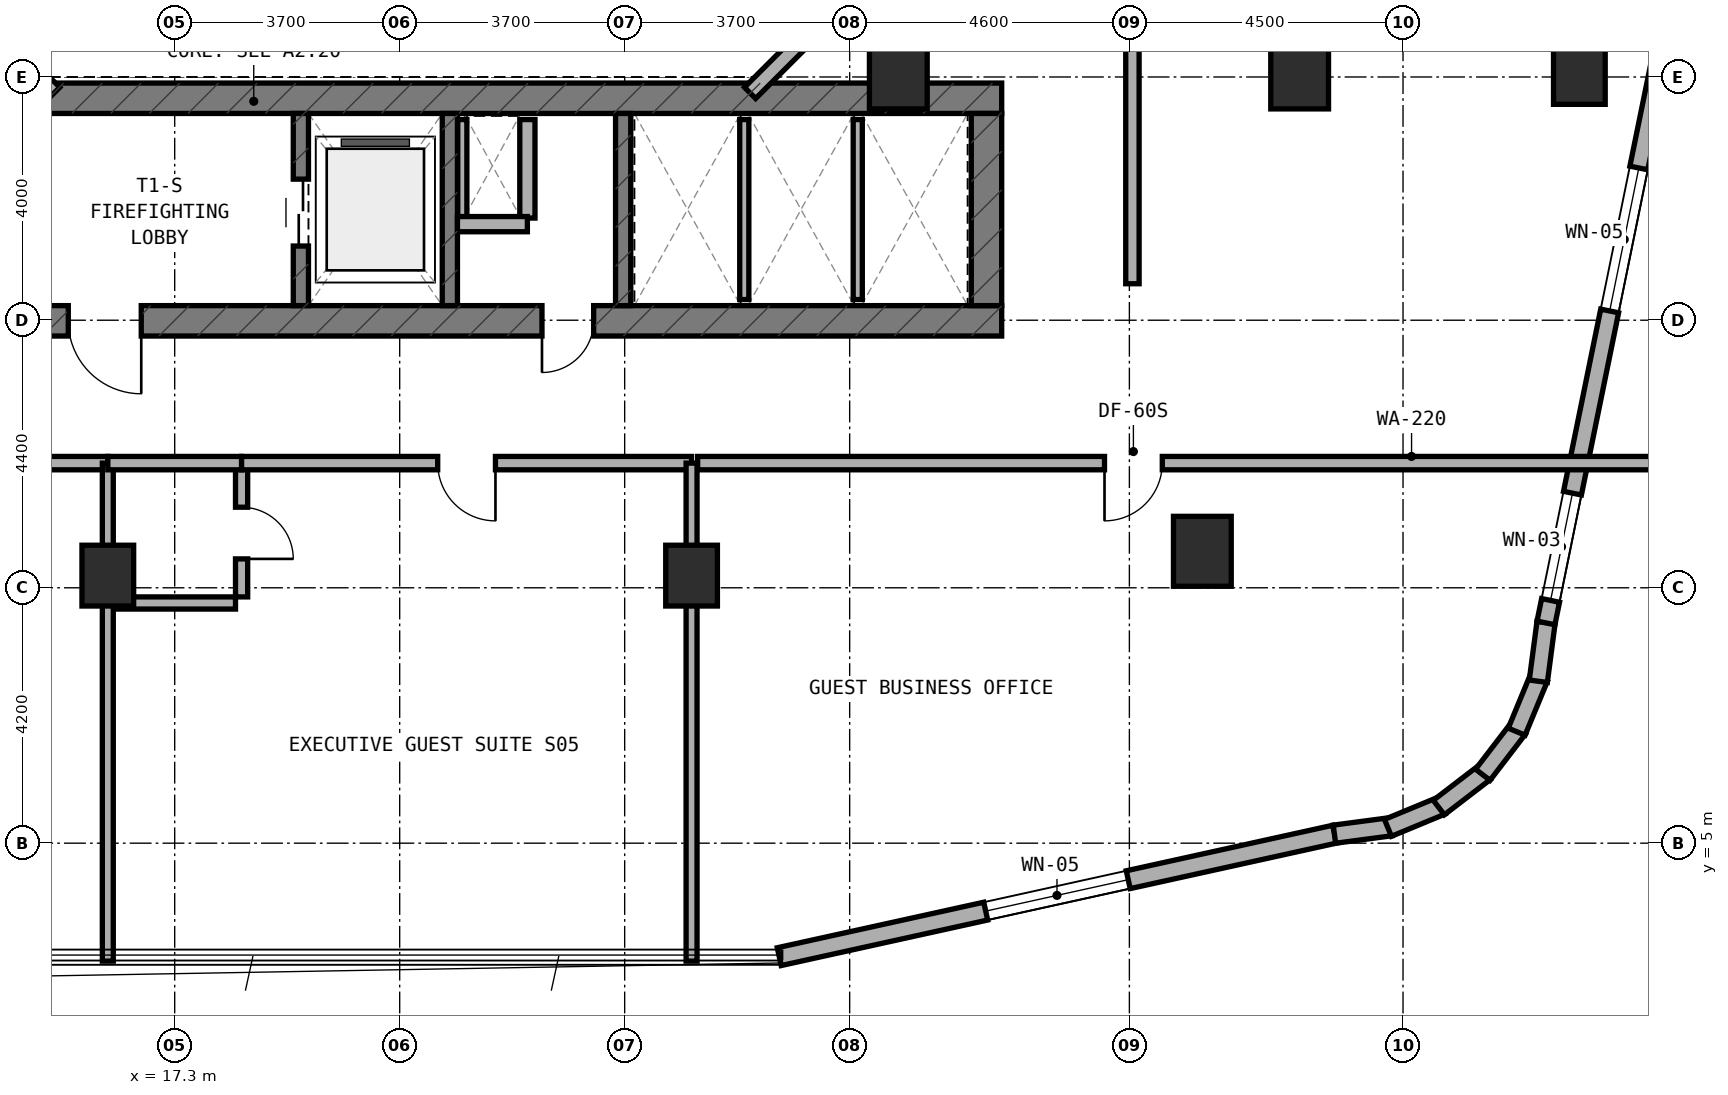
"""IFC4 building model, lengths in metres.
Left out: names, types, materials, properties, quantities, classifications, styles, units other than length and angle.
Written with IfcOpenShell. Run it as: python <this file> out.ifc"""

import sys

from ifc_helpers import new_model, si_unit, direction, frame, frame_2d, origin, origin_2d, place, context, subcontext, project, spatial, rectangle, extrude, element, fill, save


model = new_model("IFC4")
c1 = context("Model", 3, precision=1e-05, world=origin(), true_north=direction((0.0, 1.0)))
c2 = subcontext(c1, "Body", "Model", "MODEL_VIEW")
j1 = project(units=[si_unit("LENGTHUNIT", "METRE"), si_unit("PLANEANGLEUNIT", "RADIAN")], contexts=[c1])
p1 = place(None, origin())
s1 = spatial("IfcSite", under=j1, at=p1, CompositionType="ELEMENT")
p2 = place(p1, origin())
s2 = spatial("IfcBuilding", under=s1, at=p2, CompositionType="ELEMENT")
p3 = place(p2, frame((0.0, 0.0, 83.5)))
s3 = spatial("IfcBuildingStorey", under=s2, at=p3, CompositionType="ELEMENT", Elevation=83.5)
p4 = place(p3, frame((6.3, 13.59, 0.0), z_axis=(0.0, 0.0, 1.0), x_axis=(1.0, 0.0, 0.0)))
e1 = element("IfcWall", 1, at=p4, inside=s3, PredefinedType="SHEAR", context=c2, shape_type="SweptSolid", body=[
    extrude(rectangle(XDim=24.6, YDim=0.5, at=frame_2d((12.3, 0.0))), origin(), (0.0, 0.0, 1.0), 3.5),
])
p5 = place(p4, frame((9.25, 0.0, 0.0)))
e2 = element("IfcOpeningElement", 2, at=p5, cuts=e1, PredefinedType="OPENING", context=c2, shape_type="SweptSolid", body=[
    extrude(rectangle(XDim=1.2, YDim=2.15, at=frame_2d((0.6, 1.075))), frame((0.0, 0.26, 0.0), z_axis=(0.0, -1.0, 0.0), x_axis=(1.0, 0.0, 0.0)), (0.0, 0.0, 1.0), 0.52),
])
p6 = place(p4, frame((17.04, 0.0, 0.0)))
e3 = element("IfcOpeningElement", 3, at=p6, cuts=e1, PredefinedType="OPENING", context=c2, shape_type="SweptSolid", body=[
    extrude(rectangle(XDim=0.85, YDim=2.1, at=frame_2d((0.425, 1.05))), frame((0.0, 0.26, 0.0), z_axis=(0.0, -1.0, 0.0), x_axis=(1.0, 0.0, 0.0)), (0.0, 0.0, 1.0), 0.52),
])
p7 = place(p3, frame((6.3, 17.25, 0.0), z_axis=(0.0, 0.0, 1.0), x_axis=(1.0, 0.0, 0.0)))
e4 = element("IfcWall", 4, at=p7, inside=s3, PredefinedType="SHEAR", context=c2, shape_type="SweptSolid", body=[
    extrude(rectangle(XDim=24.6, YDim=0.5, at=frame_2d((12.3, 0.0))), origin(), (0.0, 0.0, 1.0), 3.5),
])
p8 = place(p3, frame((30.65, 13.84, 0.0), z_axis=(0.0, 0.0, 1.0), x_axis=(0.0, 1.0, 0.0)))
e5 = element("IfcWall", 5, at=p8, inside=s3, PredefinedType="SHEAR", context=c2, shape_type="SweptSolid", body=[
    extrude(rectangle(XDim=3.16, YDim=0.5, at=frame_2d((1.58, 0.0))), origin(), (0.0, 0.0, 1.0), 3.5),
])
p9 = place(p3, frame((19.375, 13.84, 0.0), z_axis=(0.0, 0.0, 1.0), x_axis=(0.0, 1.0, 0.0)))
e6 = element("IfcWall", 6, at=p9, inside=s3, PredefinedType="STANDARD", context=c2, shape_type="SweptSolid", body=[
    extrude(rectangle(XDim=3.16, YDim=0.25, at=frame_2d((1.58, 0.0))), origin(), (0.0, 0.0, 1.0), 3.22),
])
p10 = place(p9, frame((0.98, 0.0, 0.0)))
e7 = element("IfcOpeningElement", 7, at=p10, cuts=e6, PredefinedType="OPENING", context=c2, shape_type="SweptSolid", body=[
    extrude(rectangle(XDim=1.1, YDim=2.15, at=frame_2d((0.55, 1.075))), frame((0.0, 0.135, 0.0), z_axis=(0.0, -1.0, 0.0), x_axis=(1.0, 0.0, 0.0)), (0.0, 0.0, 1.0), 0.27),
])
for number, where, z_axis, x_axis in (
    (8, (21.825, 13.84, 0.0), (0.0, 0.0, 1.0), (0.0, 1.0, 0.0)),
    (9, (24.675, 13.84, 0.0), (0.0, 0.0, 1.0), (0.0, 1.0, 0.0)),
):
    element("IfcWall", number, at=place(p3, frame(where, z_axis=z_axis, x_axis=x_axis)), inside=s3, PredefinedType="STANDARD", context=c2, shape_type="SweptSolid", body=[
        extrude(rectangle(XDim=3.16, YDim=0.25, at=frame_2d((1.58, 0.0))), origin(), (0.0, 0.0, 1.0), 3.22),
    ])
for number, where, z_axis, x_axis in (
    (10, (16.2, 9.4, 0.0), (0.0, 0.0, 1.0), (1.0, 0.0, 0.0)),
    (11, (25.8, 9.4, 0.0), (0.0, 0.0, 1.0), (1.0, 0.0, 0.0)),
):
    element("IfcColumn", number, at=place(p3, frame(where, z_axis=z_axis, x_axis=x_axis)), inside=s3, PredefinedType="COLUMN", context=c2, shape_type="SweptSolid", body=[
        extrude(rectangle(XDim=0.85, YDim=1.0, at=origin_2d()), origin(), (0.0, 0.0, 1.0), 3.5),
    ])
for number, where, z_axis, x_axis in (
    (12, (34.2, 9.8, 0.0), (0.0, 0.0, 1.0), (1.0, 0.0, 0.0)),
    (13, (35.8, 17.65, 0.0), (0.0, 0.0, 1.0), (1.0, 0.0, 0.0)),
    (14, (29.2, 17.65, 0.0), (0.0, 0.0, 1.0), (1.0, 0.0, 0.0)),
):
    element("IfcColumn", number, at=place(p3, frame(where, z_axis=z_axis, x_axis=x_axis)), inside=s3, PredefinedType="COLUMN", context=c2, shape_type="SweptSolid", body=[
        extrude(rectangle(XDim=0.95, YDim=1.15, at=origin_2d()), origin(), (0.0, 0.0, 1.0), 3.5),
    ])
p11 = place(p3, frame((40.4, 17.65, 0.0), z_axis=(0.0, 0.0, 1.0), x_axis=(1.0, 0.0, 0.0)))
e15 = element("IfcColumn", 15, at=p11, inside=s3, PredefinedType="COLUMN", context=c2, shape_type="SweptSolid", body=[
    extrude(rectangle(XDim=0.85, YDim=1.0, at=origin_2d()), origin(), (0.0, 0.0, 1.0), 3.5),
])
p12 = place(p3, frame((27.242, 3.134, 0.0), z_axis=(0.0, 0.0, 1.0), x_axis=(0.97654500432, 0.215313386808, 0.0)))
e16 = element("IfcWall", 16, at=p12, inside=s3, PredefinedType="STANDARD", context=c2, shape_type="SweptSolid", body=[
    extrude(rectangle(XDim=9.354, YDim=0.3, at=frame_2d((4.677, 0.0))), origin(), (0.0, 0.0, 1.0), 3.22),
])
p13 = place(p12, frame((3.477, 0.0, 0.8)))
e17 = element("IfcOpeningElement", 17, at=p13, cuts=e16, PredefinedType="OPENING", context=c2, shape_type="SweptSolid", body=[
    extrude(rectangle(XDim=2.4, YDim=1.6, at=frame_2d((1.2, 0.8))), frame((0.0, 0.16, 0.0), z_axis=(0.0, -1.0, 0.0), x_axis=(1.0, 0.0, 0.0)), (0.0, 0.0, 1.0), 0.32),
])
p14 = place(p3, frame((36.372, 5.148, 0.0), z_axis=(0.0, 0.0, 1.0), x_axis=(0.991359246108, 0.131174864804, 0.0)))
e18 = element("IfcWall", 18, at=p14, inside=s3, PredefinedType="STANDARD", context=c2, shape_type="SweptSolid", body=[
    extrude(rectangle(XDim=0.938, YDim=0.3, at=frame_2d((0.469, 0.0))), origin(), (0.0, 0.0, 1.0), 3.22),
])
p15 = place(p3, frame((37.252, 5.252, 0.0), z_axis=(0.0, 0.0, 1.0), x_axis=(0.924019948111, 0.382344263057, 0.0)))
e19 = element("IfcWall", 19, at=p15, inside=s3, PredefinedType="STANDARD", context=c2, shape_type="SweptSolid", body=[
    extrude(rectangle(XDim=0.955, YDim=0.3, at=frame_2d((0.477, 0.0))), origin(), (0.0, 0.0, 1.0), 3.22),
])
p16 = place(p3, frame((38.089, 5.586, 0.0), z_axis=(0.0, 0.0, 1.0), x_axis=(0.793573440799, 0.608474481025, 0.0)))
e20 = element("IfcWall", 20, at=p16, inside=s3, PredefinedType="STANDARD", context=c2, shape_type="SweptSolid", body=[
    extrude(rectangle(XDim=0.955, YDim=0.3, at=frame_2d((0.478, 0.0))), origin(), (0.0, 0.0, 1.0), 3.22),
])
p17 = place(p3, frame((38.812, 6.125, 0.0), z_axis=(0.0, 0.0, 1.0), x_axis=(0.608351047625, 0.793668068435, 0.0)))
e21 = element("IfcWall", 21, at=p17, inside=s3, PredefinedType="STANDARD", context=c2, shape_type="SweptSolid", body=[
    extrude(rectangle(XDim=0.955, YDim=0.3, at=frame_2d((0.478, 0.0))), origin(), (0.0, 0.0, 1.0), 3.22),
])
p18 = place(p3, frame((39.369, 6.834, 0.0), z_axis=(0.0, 0.0, 1.0), x_axis=(0.382344263057, 0.924019948111, 0.0)))
e22 = element("IfcWall", 22, at=p18, inside=s3, PredefinedType="STANDARD", context=c2, shape_type="SweptSolid", body=[
    extrude(rectangle(XDim=0.955, YDim=0.3, at=frame_2d((0.477, 0.0))), origin(), (0.0, 0.0, 1.0), 3.22),
])
p19 = place(p3, frame((39.725, 7.663, 0.0), z_axis=(0.0, 0.0, 1.0), x_axis=(0.130454512571, 0.991454295543, 0.0)))
e23 = element("IfcWall", 23, at=p19, inside=s3, PredefinedType="STANDARD", context=c2, shape_type="SweptSolid", body=[
    extrude(rectangle(XDim=0.973, YDim=0.3, at=frame_2d((0.487, 0.0))), origin(), (0.0, 0.0, 1.0), 3.22),
])
p20 = place(p3, frame((39.851, 8.622, 0.0), z_axis=(0.0, 0.0, 1.0), x_axis=(0.199990901713, 0.979797754249, 0.0)))
e24 = element("IfcWall", 24, at=p20, inside=s3, PredefinedType="STANDARD", context=c2, shape_type="SweptSolid", body=[
    extrude(rectangle(XDim=10.065, YDim=0.3, at=frame_2d((5.033, 0.0))), origin(), (0.0, 0.0, 1.0), 3.22),
])
p21 = place(p20, frame((0.378, 0.0, 0.85)))
e25 = element("IfcOpeningElement", 25, at=p21, cuts=e24, PredefinedType="OPENING", context=c2, shape_type="SweptSolid", body=[
    extrude(rectangle(XDim=1.8, YDim=1.5, at=frame_2d((0.9, 0.75))), frame((0.0, 0.16, 0.0), z_axis=(0.0, -1.0, 0.0), x_axis=(1.0, 0.0, 0.0)), (0.0, 0.0, 1.0), 0.32),
])
p22 = place(p20, frame((5.236, 0.0, 0.8)))
e26 = element("IfcOpeningElement", 26, at=p22, cuts=e24, PredefinedType="OPENING", context=c2, shape_type="SweptSolid", body=[
    extrude(rectangle(XDim=2.4, YDim=1.6, at=frame_2d((1.2, 0.8))), frame((0.0, 0.16, 0.0), z_axis=(0.0, -1.0, 0.0), x_axis=(1.0, 0.0, 0.0)), (0.0, 0.0, 1.0), 0.32),
])
p23 = place(p3, frame((26.762, 17.338, 0.0), z_axis=(0.0, 0.0, 1.0), x_axis=(0.707059717605, 0.707153841636, 0.0)))
e27 = element("IfcWall", 27, at=p23, inside=s3, PredefinedType="STANDARD", context=c2, shape_type="SweptSolid", body=[
    extrude(rectangle(XDim=2.594, YDim=0.26, at=frame_2d((1.297, 0.0))), origin(), (0.0, 0.0, 1.0), 3.22),
])
p24 = place(p3, frame((13.484, 19.172, 0.0), z_axis=(0.0, 0.0, 1.0), x_axis=(0.707106781187, -0.707106781187, 0.0)))
e28 = element("IfcWall", 28, at=p24, inside=s3, PredefinedType="STANDARD", context=c2, shape_type="SweptSolid", body=[
    extrude(rectangle(XDim=2.594, YDim=0.26, at=frame_2d((1.297, 0.0))), origin(), (0.0, 0.0, 1.0), 3.22),
])
p25 = place(p3, frame((22.03, 15.28, 0.0), z_axis=(0.0, 0.0, 1.0), x_axis=(0.0, 1.0, 0.0)))
e29 = element("IfcWall", 29, at=p25, inside=s3, PredefinedType="PARTITIONING", context=c2, shape_type="SweptSolid", body=[
    extrude(rectangle(XDim=1.62, YDim=0.15, at=frame_2d((0.81, 0.0))), origin(), (0.0, 0.0, 1.0), 3.22),
])
p26 = place(p3, frame((23.1, 15.28, 0.0), z_axis=(0.0, 0.0, 1.0), x_axis=(0.0, 1.0, 0.0)))
e30 = element("IfcWall", 30, at=p26, inside=s3, PredefinedType="SOLIDWALL", context=c2, shape_type="SweptSolid", body=[
    extrude(rectangle(XDim=1.62, YDim=0.25, at=frame_2d((0.81, 0.0))), origin(), (0.0, 0.0, 1.0), 3.22),
])
p27 = place(p3, frame((21.95, 15.18, 0.0), z_axis=(0.0, 0.0, 1.0), x_axis=(1.0, 0.0, 0.0)))
e31 = element("IfcWall", 31, at=p27, inside=s3, PredefinedType="SOLIDWALL", context=c2, shape_type="SweptSolid", body=[
    extrude(rectangle(XDim=1.15, YDim=0.25, at=frame_2d((0.575, 0.0))), origin(), (0.0, 0.0, 1.0), 3.22),
])
p28 = place(p3, frame((26.667, 13.94, 0.0), z_axis=(0.0, 0.0, 1.0), x_axis=(0.0, 1.0, 0.0)))
e32 = element("IfcWall", 32, at=p28, inside=s3, PredefinedType="PARTITIONING", context=c2, shape_type="SweptSolid", body=[
    extrude(rectangle(XDim=2.96, YDim=0.15, at=frame_2d((1.48, 0.0))), origin(), (0.0, 0.0, 1.0), 3.22),
])
p29 = place(p3, frame((28.533, 13.94, 0.0), z_axis=(0.0, 0.0, 1.0), x_axis=(0.0, 1.0, 0.0)))
e33 = element("IfcWall", 33, at=p29, inside=s3, PredefinedType="PARTITIONING", context=c2, shape_type="SweptSolid", body=[
    extrude(rectangle(XDim=2.96, YDim=0.15, at=frame_2d((1.48, 0.0))), origin(), (0.0, 0.0, 1.0), 2.595),
])
p30 = place(p3, frame((10.0, 11.25, 0.0), z_axis=(0.0, 0.0, 1.0), x_axis=(1.0, 0.0, 0.0)))
e34 = element("IfcWall", 34, at=p30, inside=s3, PredefinedType="SOLIDWALL", context=c2, shape_type="SweptSolid", body=[
    extrude(rectangle(XDim=6.2, YDim=0.22, at=frame_2d((3.1, 0.0))), origin(), (0.0, 0.0, 1.0), 2.595),
])
p31 = place(p30, frame((2.625, 0.0, 0.0)))
e35 = element("IfcOpeningElement", 35, at=p31, cuts=e34, PredefinedType="OPENING", context=c2, shape_type="SweptSolid", body=[
    extrude(rectangle(XDim=0.95, YDim=2.1, at=frame_2d((0.475, 1.05))), frame((0.0, 0.12, 0.0), z_axis=(0.0, -1.0, 0.0), x_axis=(1.0, 0.0, 0.0)), (0.0, 0.0, 1.0), 0.24),
])
p32 = place(p3, frame((16.2, 3.06, 0.0), z_axis=(0.0, 0.0, 1.0), x_axis=(0.0, 1.0, 0.0)))
e36 = element("IfcWall", 36, at=p32, inside=s3, PredefinedType="SOLIDWALL", context=c2, shape_type="SweptSolid", body=[
    extrude(rectangle(XDim=8.19, YDim=0.18, at=frame_2d((4.095, 0.0))), origin(), (0.0, 0.0, 1.0), 2.595),
])
p33 = place(p3, frame((18.4, 9.05, 0.0), z_axis=(0.0, 0.0, 1.0), x_axis=(0.0, 1.0, 0.0)))
e37 = element("IfcWall", 37, at=p33, inside=s3, PredefinedType="PLUMBINGWALL", context=c2, shape_type="SweptSolid", body=[
    extrude(rectangle(XDim=2.1, YDim=0.2, at=frame_2d((1.05, 0.0))), origin(), (0.0, 0.0, 1.0), 2.745),
])
p34 = place(p33, frame((0.625, 0.0, 0.0)))
e38 = element("IfcOpeningElement", 38, at=p34, cuts=e37, PredefinedType="OPENING", context=c2, shape_type="SweptSolid", body=[
    extrude(rectangle(XDim=0.85, YDim=2.1, at=frame_2d((0.425, 1.05))), frame((0.0, 0.11, 0.0), z_axis=(0.0, -1.0, 0.0), x_axis=(1.0, 0.0, 0.0)), (0.0, 0.0, 1.0), 0.22),
])
p35 = place(p3, frame((16.3, 8.95, 0.0), z_axis=(0.0, 0.0, 1.0), x_axis=(1.0, 0.0, 0.0)))
e39 = element("IfcWall", 39, at=p35, inside=s3, PredefinedType="PLUMBINGWALL", context=c2, shape_type="SweptSolid", body=[
    extrude(rectangle(XDim=2.0, YDim=0.2, at=frame_2d((1.0, 0.0))), origin(), (0.0, 0.0, 1.0), 3.22),
])
p36 = place(p3, frame((16.2, 11.25, 0.0), z_axis=(0.0, 0.0, 1.0), x_axis=(1.0, 0.0, 0.0)))
e40 = element("IfcWall", 40, at=p36, inside=s3, PredefinedType="SOLIDWALL", context=c2, shape_type="SweptSolid", body=[
    extrude(rectangle(XDim=2.2, YDim=0.22, at=frame_2d((1.1, 0.0))), origin(), (0.0, 0.0, 1.0), 2.595),
])
p37 = place(p3, frame((18.4, 11.25, 0.0), z_axis=(0.0, 0.0, 1.0), x_axis=(1.0, 0.0, 0.0)))
e41 = element("IfcWall", 41, at=p37, inside=s3, PredefinedType="SOLIDWALL", context=c2, shape_type="SweptSolid", body=[
    extrude(rectangle(XDim=7.4, YDim=0.22, at=frame_2d((3.7, 0.0))), origin(), (0.0, 0.0, 1.0), 2.595),
])
p38 = place(p37, frame((3.225, 0.0, 0.0)))
e42 = element("IfcOpeningElement", 42, at=p38, cuts=e41, PredefinedType="OPENING", context=c2, shape_type="SweptSolid", body=[
    extrude(rectangle(XDim=0.95, YDim=2.1, at=frame_2d((0.475, 1.05))), frame((0.0, 0.12, 0.0), z_axis=(0.0, -1.0, 0.0), x_axis=(1.0, 0.0, 0.0)), (0.0, 0.0, 1.0), 0.24),
])
p39 = place(p3, frame((25.8, 3.06, 0.0), z_axis=(0.0, 0.0, 1.0), x_axis=(0.0, 1.0, 0.0)))
e43 = element("IfcWall", 43, at=p39, inside=s3, PredefinedType="SOLIDWALL", context=c2, shape_type="SweptSolid", body=[
    extrude(rectangle(XDim=8.19, YDim=0.18, at=frame_2d((4.095, 0.0))), origin(), (0.0, 0.0, 1.0), 2.595),
])
p40 = place(p3, frame((25.9, 11.25, 0.0), z_axis=(0.0, 0.0, 1.0), x_axis=(1.0, 0.0, 0.0)))
e44 = element("IfcWall", 44, at=p40, inside=s3, PredefinedType="SOLIDWALL", context=c2, shape_type="SweptSolid", body=[
    extrude(rectangle(XDim=15.84, YDim=0.22, at=frame_2d((7.92, 0.0))), origin(), (0.0, 0.0, 1.0), 2.595),
])
p41 = place(p40, frame((6.691, 0.0, 0.0)))
e45 = element("IfcOpeningElement", 45, at=p41, cuts=e44, PredefinedType="OPENING", context=c2, shape_type="SweptSolid", body=[
    extrude(rectangle(XDim=0.95, YDim=2.1, at=frame_2d((0.475, 1.05))), frame((0.0, 0.12, 0.0), z_axis=(0.0, -1.0, 0.0), x_axis=(1.0, 0.0, 0.0)), (0.0, 0.0, 1.0), 0.24),
])
p42 = place(p3, frame((33.05, 14.2, 0.0), z_axis=(0.0, 0.0, 1.0), x_axis=(0.0, 1.0, 0.0)))
e46 = element("IfcWall", 46, at=p42, inside=s3, PredefinedType="SOLIDWALL", context=c2, shape_type="SweptSolid", body=[
    extrude(rectangle(XDim=10.14, YDim=0.22, at=frame_2d((5.07, 0.0))), origin(), (0.0, 0.0, 1.0), 2.595),
])
p43 = place(p42, frame((4.595, 0.0, 0.0)))
e47 = element("IfcOpeningElement", 47, at=p43, cuts=e46, PredefinedType="OPENING", context=c2, shape_type="SweptSolid", body=[
    extrude(rectangle(XDim=0.95, YDim=2.1, at=frame_2d((0.475, 1.05))), frame((0.0, 0.12, 0.0), z_axis=(0.0, -1.0, 0.0), x_axis=(1.0, 0.0, 0.0)), (0.0, 0.0, 1.0), 0.24),
])
p44 = place(p13, origin())
e48 = element("IfcWindow", 48, at=p44, inside=s3, PartitioningType="SINGLE_PANEL", PredefinedType="WINDOW", context=c2, shape_type="SweptSolid", body=[
    extrude(rectangle(XDim=2.4, YDim=1.6, at=frame_2d((1.2, 0.8))), frame((0.0, 0.03, 0.0), z_axis=(0.0, -1.0, 0.0), x_axis=(1.0, 0.0, 0.0)), (0.0, 0.0, 1.0), 0.06),
])
fill(e17, e48)
p45 = place(p21, origin())
e49 = element("IfcWindow", 49, at=p45, inside=s3, PartitioningType="SINGLE_PANEL", PredefinedType="WINDOW", context=c2, shape_type="SweptSolid", body=[
    extrude(rectangle(XDim=1.8, YDim=1.5, at=frame_2d((0.9, 0.75))), frame((0.0, 0.03, 0.0), z_axis=(0.0, -1.0, 0.0), x_axis=(1.0, 0.0, 0.0)), (0.0, 0.0, 1.0), 0.06),
])
fill(e25, e49)
p46 = place(p22, origin())
e50 = element("IfcWindow", 50, at=p46, inside=s3, PartitioningType="SINGLE_PANEL", PredefinedType="WINDOW", context=c2, shape_type="SweptSolid", body=[
    extrude(rectangle(XDim=2.4, YDim=1.6, at=frame_2d((1.2, 0.8))), frame((0.0, 0.03, 0.0), z_axis=(0.0, -1.0, 0.0), x_axis=(1.0, 0.0, 0.0)), (0.0, 0.0, 1.0), 0.06),
])
fill(e26, e50)
p47 = place(p5, frame((1.2, 0.0, 0.0), z_axis=(0.0, 0.0, 1.0), x_axis=(-1.0, 0.0, 0.0)))
e51 = element("IfcDoor", 51, at=p47, inside=s3, OperationType="SINGLE_SWING_LEFT", PredefinedType="DOOR", context=c2, shape_type="SweptSolid", body=[
    extrude(rectangle(XDim=1.2, YDim=2.15, at=frame_2d((0.6, 1.075))), frame((0.0, 0.025, 0.0), z_axis=(0.0, -1.0, 0.0), x_axis=(1.0, 0.0, 0.0)), (0.0, 0.0, 1.0), 0.05),
])
fill(e2, e51)
p48 = place(p10, origin())
e52 = element("IfcDoor", 52, at=p48, inside=s3, OperationType="DOUBLE_DOOR_SLIDING", PredefinedType="DOOR", context=c2, shape_type="SweptSolid", body=[
    extrude(rectangle(XDim=1.1, YDim=2.15, at=frame_2d((0.55, 1.075))), frame((0.0, 0.025, 0.0), z_axis=(0.0, -1.0, 0.0), x_axis=(1.0, 0.0, 0.0)), (0.0, 0.0, 1.0), 0.05),
])
fill(e7, e52)
p49 = place(p6, frame((0.85, 0.0, 0.0), z_axis=(0.0, 0.0, 1.0), x_axis=(-1.0, 0.0, 0.0)))
e53 = element("IfcDoor", 53, at=p49, inside=s3, OperationType="SINGLE_SWING_RIGHT", PredefinedType="DOOR", context=c2, shape_type="SweptSolid", body=[
    extrude(rectangle(XDim=0.85, YDim=2.1, at=frame_2d((0.425, 1.05))), frame((0.0, 0.025, 0.0), z_axis=(0.0, -1.0, 0.0), x_axis=(1.0, 0.0, 0.0)), (0.0, 0.0, 1.0), 0.05),
])
fill(e3, e53)
p50 = place(p34, frame((0.85, 0.0, 0.0), z_axis=(0.0, 0.0, 1.0), x_axis=(-1.0, 0.0, 0.0)))
e54 = element("IfcDoor", 54, at=p50, inside=s3, OperationType="SINGLE_SWING_RIGHT", PredefinedType="DOOR", context=c2, shape_type="SweptSolid", body=[
    extrude(rectangle(XDim=0.85, YDim=2.1, at=frame_2d((0.425, 1.05))), frame((0.0, 0.025, 0.0), z_axis=(0.0, -1.0, 0.0), x_axis=(1.0, 0.0, 0.0)), (0.0, 0.0, 1.0), 0.05),
])
fill(e38, e54)
p51 = place(p38, frame((0.95, 0.0, 0.0), z_axis=(0.0, 0.0, 1.0), x_axis=(-1.0, 0.0, 0.0)))
e55 = element("IfcDoor", 55, at=p51, inside=s3, OperationType="SINGLE_SWING_LEFT", PredefinedType="DOOR", context=c2, shape_type="SweptSolid", body=[
    extrude(rectangle(XDim=0.95, YDim=2.1, at=frame_2d((0.475, 1.05))), frame((0.0, 0.025, 0.0), z_axis=(0.0, -1.0, 0.0), x_axis=(1.0, 0.0, 0.0)), (0.0, 0.0, 1.0), 0.05),
])
fill(e42, e55)
p52 = place(p41, frame((0.95, 0.0, 0.0), z_axis=(0.0, 0.0, 1.0), x_axis=(-1.0, 0.0, 0.0)))
e56 = element("IfcDoor", 56, at=p52, inside=s3, OperationType="SINGLE_SWING_RIGHT", PredefinedType="DOOR", context=c2, shape_type="SweptSolid", body=[
    extrude(rectangle(XDim=0.95, YDim=2.1, at=frame_2d((0.475, 1.05))), frame((0.0, 0.025, 0.0), z_axis=(0.0, -1.0, 0.0), x_axis=(1.0, 0.0, 0.0)), (0.0, 0.0, 1.0), 0.05),
])
fill(e45, e56)
save(model, sys.argv[1])
